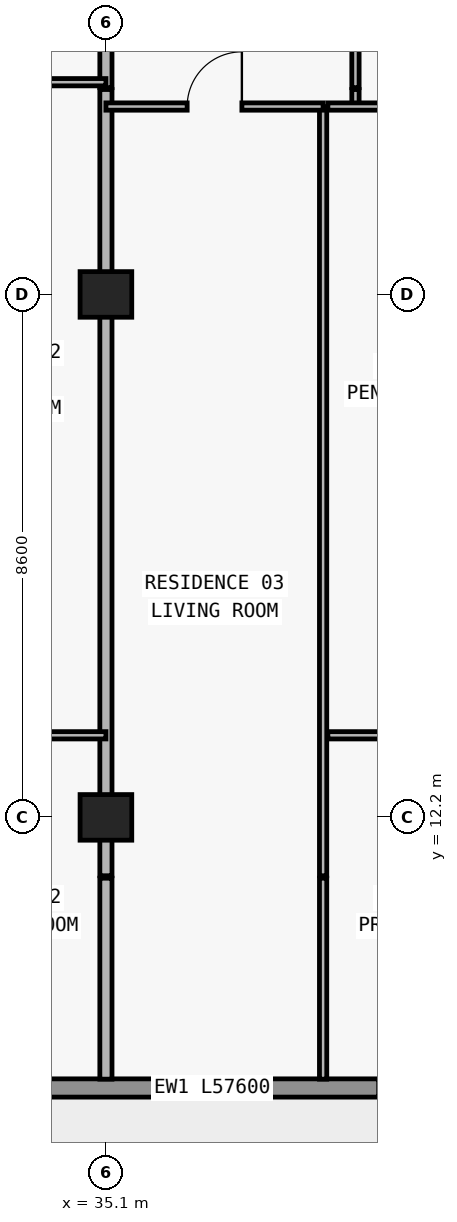
"""IFC4 building model, lengths in metres.
Left out: names, types, materials, properties, quantities, classifications, styles, units other than length and angle.
Written with IfcOpenShell. Run it as: python <this file> out.ifc"""

import sys

from ifc_helpers import new_model, si_unit, direction, frame, frame_2d, origin, origin_2d, place, context, subcontext, project, spatial, rectangle, extrude, element, fill, save


model = new_model("IFC4")
c1 = context("Model", 3, precision=1e-05, world=origin(), true_north=direction((0.0, 1.0)))
c2 = subcontext(c1, "Body", "Model", "MODEL_VIEW")
j1 = project(units=[si_unit("LENGTHUNIT", "METRE"), si_unit("PLANEANGLEUNIT", "RADIAN")], contexts=[c1])
p1 = place(None, origin())
s1 = spatial("IfcSite", under=j1, at=p1, CompositionType="ELEMENT")
p2 = place(p1, origin())
s2 = spatial("IfcBuilding", under=s1, at=p2, CompositionType="ELEMENT")
p3 = place(p2, frame((0.0, 0.0, 163.8)))
s3 = spatial("IfcBuildingStorey", under=s2, at=p3, CompositionType="ELEMENT", Elevation=163.8)
for number, where, z_axis, x_axis in (
    (1, (35.1, 12.2, 0.0), (0.0, 0.0, 1.0), (1.0, 0.0, 0.0)),
    (2, (35.1, 20.8, 0.0), (0.0, 0.0, 1.0), (1.0, 0.0, 0.0)),
):
    element("IfcColumn", number, at=place(p3, frame(where, z_axis=z_axis, x_axis=x_axis)), inside=s3, PredefinedType="COLUMN", context=c2, shape_type="SweptSolid", body=[
        extrude(rectangle(XDim=0.85, YDim=0.75, at=origin_2d()), origin(), (0.0, 0.0, 1.0), 3.05),
    ])
p4 = place(p3, frame((67.7, 7.75, 0.0), z_axis=(0.0, 0.0, 1.0), x_axis=(-1.0, 0.0, 0.0)))
e3 = element("IfcWall", 3, at=p4, inside=s3, PredefinedType="STANDARD", context=c2, shape_type="SweptSolid", body=[
    extrude(rectangle(XDim=57.6, YDim=0.3, at=frame_2d((28.8, 0.0))), origin(), (0.0, 0.0, 1.0), 3.05),
])
p5 = place(p4, frame((54.69, 0.0, 0.0)))
e4 = element("IfcOpeningElement", 4, at=p5, cuts=e3, PredefinedType="OPENING", context=c2, shape_type="SweptSolid", body=[
    extrude(rectangle(XDim=2.0, YDim=2.3, at=frame_2d((1.0, 1.15))), frame((0.0, 0.16, 0.0), z_axis=(0.0, -1.0, 0.0), x_axis=(1.0, 0.0, 0.0)), (0.0, 0.0, 1.0), 0.32),
])
p6 = place(p4, frame((50.21, 0.0, 0.65)))
e5 = element("IfcOpeningElement", 5, at=p6, cuts=e3, PredefinedType="OPENING", context=c2, shape_type="SweptSolid", body=[
    extrude(rectangle(XDim=2.6, YDim=1.85, at=frame_2d((1.3, 0.925))), frame((0.0, 0.16, 0.0), z_axis=(0.0, -1.0, 0.0), x_axis=(1.0, 0.0, 0.0)), (0.0, 0.0, 1.0), 0.32),
])
p7 = place(p4, frame((44.1, 0.0, 0.85)))
e6 = element("IfcOpeningElement", 6, at=p7, cuts=e3, PredefinedType="OPENING", context=c2, shape_type="SweptSolid", body=[
    extrude(rectangle(XDim=2.2, YDim=1.55, at=frame_2d((1.1, 0.775))), frame((0.0, 0.16, 0.0), z_axis=(0.0, -1.0, 0.0), x_axis=(1.0, 0.0, 0.0)), (0.0, 0.0, 1.0), 0.32),
])
p8 = place(p4, frame((37.69, 0.0, 0.0)))
e7 = element("IfcOpeningElement", 7, at=p8, cuts=e3, PredefinedType="OPENING", context=c2, shape_type="SweptSolid", body=[
    extrude(rectangle(XDim=2.0, YDim=2.3, at=frame_2d((1.0, 1.15))), frame((0.0, 0.16, 0.0), z_axis=(0.0, -1.0, 0.0), x_axis=(1.0, 0.0, 0.0)), (0.0, 0.0, 1.0), 0.32),
])
p9 = place(p4, frame((33.59, 0.0, 0.85)))
e8 = element("IfcOpeningElement", 8, at=p9, cuts=e3, PredefinedType="OPENING", context=c2, shape_type="SweptSolid", body=[
    extrude(rectangle(XDim=1.8, YDim=1.55, at=frame_2d((0.9, 0.775))), frame((0.0, 0.16, 0.0), z_axis=(0.0, -1.0, 0.0), x_axis=(1.0, 0.0, 0.0)), (0.0, 0.0, 1.0), 0.32),
])
p10 = place(p4, frame((25.914, 0.0, 0.85)))
e9 = element("IfcOpeningElement", 9, at=p10, cuts=e3, PredefinedType="OPENING", context=c2, shape_type="SweptSolid", body=[
    extrude(rectangle(XDim=2.2, YDim=1.55, at=frame_2d((1.1, 0.775))), frame((0.0, 0.16, 0.0), z_axis=(0.0, -1.0, 0.0), x_axis=(1.0, 0.0, 0.0)), (0.0, 0.0, 1.0), 0.32),
])
p11 = place(p4, frame((21.69, 0.0, 0.0)))
e10 = element("IfcOpeningElement", 10, at=p11, cuts=e3, PredefinedType="OPENING", context=c2, shape_type="SweptSolid", body=[
    extrude(rectangle(XDim=2.0, YDim=2.3, at=frame_2d((1.0, 1.15))), frame((0.0, 0.16, 0.0), z_axis=(0.0, -1.0, 0.0), x_axis=(1.0, 0.0, 0.0)), (0.0, 0.0, 1.0), 0.32),
])
p12 = place(p4, frame((17.59, 0.0, 0.85)))
e11 = element("IfcOpeningElement", 11, at=p12, cuts=e3, PredefinedType="OPENING", context=c2, shape_type="SweptSolid", body=[
    extrude(rectangle(XDim=1.8, YDim=1.55, at=frame_2d((0.9, 0.775))), frame((0.0, 0.16, 0.0), z_axis=(0.0, -1.0, 0.0), x_axis=(1.0, 0.0, 0.0)), (0.0, 0.0, 1.0), 0.32),
])
p13 = place(p4, frame((13.69, 0.0, 0.0)))
e12 = element("IfcOpeningElement", 12, at=p13, cuts=e3, PredefinedType="OPENING", context=c2, shape_type="SweptSolid", body=[
    extrude(rectangle(XDim=2.0, YDim=2.3, at=frame_2d((1.0, 1.15))), frame((0.0, 0.16, 0.0), z_axis=(0.0, -1.0, 0.0), x_axis=(1.0, 0.0, 0.0)), (0.0, 0.0, 1.0), 0.32),
])
p14 = place(p4, frame((9.01, 0.0, 0.65)))
e13 = element("IfcOpeningElement", 13, at=p14, cuts=e3, PredefinedType="OPENING", context=c2, shape_type="SweptSolid", body=[
    extrude(rectangle(XDim=2.6, YDim=1.85, at=frame_2d((1.3, 0.925))), frame((0.0, 0.16, 0.0), z_axis=(0.0, -1.0, 0.0), x_axis=(1.0, 0.0, 0.0)), (0.0, 0.0, 1.0), 0.32),
])
p15 = place(p4, frame((3.0, 0.0, 0.85)))
e14 = element("IfcOpeningElement", 14, at=p15, cuts=e3, PredefinedType="OPENING", context=c2, shape_type="SweptSolid", body=[
    extrude(rectangle(XDim=2.2, YDim=1.55, at=frame_2d((1.1, 0.775))), frame((0.0, 0.16, 0.0), z_axis=(0.0, -1.0, 0.0), x_axis=(1.0, 0.0, 0.0)), (0.0, 0.0, 1.0), 0.32),
])
p16 = place(p3, frame((35.1, 7.895, 0.0), z_axis=(0.0, 0.0, 1.0), x_axis=(0.0, 1.0, 0.0)))
e15 = element("IfcWall", 15, at=p16, inside=s3, PredefinedType="PARTITIONING", context=c2, shape_type="SweptSolid", body=[
    extrude(rectangle(XDim=3.305, YDim=0.2, at=frame_2d((1.652, 0.0))), origin(), (0.0, 0.0, 1.0), 3.05),
])
p17 = place(p3, frame((35.1, 11.24, 0.0), z_axis=(0.0, 0.0, 1.0), x_axis=(0.0, 1.0, 0.0)))
e16 = element("IfcWall", 16, at=p17, inside=s3, PredefinedType="PARTITIONING", context=c2, shape_type="SweptSolid", body=[
    extrude(rectangle(XDim=12.93, YDim=0.2, at=frame_2d((6.465, 0.0))), origin(), (0.0, 0.0, 1.0), 2.263),
])
p18 = place(p3, frame((35.1, 24.2, 0.0), z_axis=(0.0, 0.0, 1.0), x_axis=(0.0, 1.0, 0.0)))
e17 = element("IfcWall", 17, at=p18, inside=s3, PredefinedType="PARTITIONING", context=c2, shape_type="SweptSolid", body=[
    extrude(rectangle(XDim=4.84, YDim=0.2, at=frame_2d((2.42, 0.0))), origin(), (0.0, 0.0, 1.0), 2.263),
])
p19 = place(p3, frame((38.672, 7.895, 0.0), z_axis=(0.0, 0.0, 1.0), x_axis=(0.0, 1.0, 0.0)))
e18 = element("IfcWall", 18, at=p19, inside=s3, PredefinedType="PARTITIONING", context=c2, shape_type="SweptSolid", body=[
    extrude(rectangle(XDim=3.305, YDim=0.12, at=frame_2d((1.652, 0.0))), origin(), (0.0, 0.0, 1.0), 3.05),
])
p20 = place(p3, frame((38.672, 11.24, 0.0), z_axis=(0.0, 0.0, 1.0), x_axis=(0.0, 1.0, 0.0)))
e19 = element("IfcWall", 19, at=p20, inside=s3, PredefinedType="PARTITIONING", context=c2, shape_type="SweptSolid", body=[
    extrude(rectangle(XDim=12.65, YDim=0.12, at=frame_2d((6.325, 0.0))), origin(), (0.0, 0.0, 1.0), 2.499),
])
p21 = place(p3, frame((39.204, 23.89, 0.0), z_axis=(0.0, 0.0, 1.0), x_axis=(0.0, 1.0, 0.0)))
e20 = element("IfcWall", 20, at=p21, inside=s3, PredefinedType="PARTITIONING", context=c2, shape_type="SweptSolid", body=[
    extrude(rectangle(XDim=0.28, YDim=0.12, at=frame_2d((0.14, 0.0))), origin(), (0.0, 0.0, 1.0), 3.05),
])
p22 = place(p3, frame((39.204, 24.2, 0.0), z_axis=(0.0, 0.0, 1.0), x_axis=(0.0, 1.0, 0.0)))
e21 = element("IfcWall", 21, at=p22, inside=s3, PredefinedType="PARTITIONING", context=c2, shape_type="SweptSolid", body=[
    extrude(rectangle(XDim=4.84, YDim=0.12, at=frame_2d((2.42, 0.0))), origin(), (0.0, 0.0, 1.0), 3.05),
])
p23 = place(p22, frame((1.97, 0.0, 0.0)))
e22 = element("IfcOpeningElement", 22, at=p23, cuts=e21, PredefinedType="OPENING", context=c2, shape_type="SweptSolid", body=[
    extrude(rectangle(XDim=0.9, YDim=2.15, at=frame_2d((0.45, 1.075))), frame((0.0, 0.07, 0.0), z_axis=(0.0, -1.0, 0.0), x_axis=(1.0, 0.0, 0.0)), (0.0, 0.0, 1.0), 0.14),
])
p24 = place(p3, frame((31.32, 13.55, 0.0), z_axis=(0.0, 0.0, 1.0), x_axis=(1.0, 0.0, 0.0)))
e23 = element("IfcWall", 23, at=p24, inside=s3, PredefinedType="PARTITIONING", context=c2, shape_type="SweptSolid", body=[
    extrude(rectangle(XDim=3.78, YDim=0.12, at=frame_2d((1.89, 0.0))), origin(), (0.0, 0.0, 1.0), 3.05),
])
p25 = place(p24, frame((1.44, 0.0, 0.0)))
e24 = element("IfcOpeningElement", 24, at=p25, cuts=e23, PredefinedType="OPENING", context=c2, shape_type="SweptSolid", body=[
    extrude(rectangle(XDim=0.9, YDim=2.15, at=frame_2d((0.45, 1.075))), frame((0.0, 0.07, 0.0), z_axis=(0.0, -1.0, 0.0), x_axis=(1.0, 0.0, 0.0)), (0.0, 0.0, 1.0), 0.14),
])
p26 = place(p3, frame((38.75, 13.55, 0.0), z_axis=(0.0, 0.0, 1.0), x_axis=(1.0, 0.0, 0.0)))
e25 = element("IfcWall", 25, at=p26, inside=s3, PredefinedType="PARTITIONING", context=c2, shape_type="SweptSolid", body=[
    extrude(rectangle(XDim=3.95, YDim=0.12, at=frame_2d((1.975, 0.0))), origin(), (0.0, 0.0, 1.0), 3.05),
])
p27 = place(p26, frame((1.525, 0.0, 0.0)))
e26 = element("IfcOpeningElement", 26, at=p27, cuts=e25, PredefinedType="OPENING", context=c2, shape_type="SweptSolid", body=[
    extrude(rectangle(XDim=0.9, YDim=2.15, at=frame_2d((0.45, 1.075))), frame((0.0, 0.07, 0.0), z_axis=(0.0, -1.0, 0.0), x_axis=(1.0, 0.0, 0.0)), (0.0, 0.0, 1.0), 0.14),
])
p28 = place(p3, frame((35.1, 23.89, 0.0), z_axis=(0.0, 0.0, 1.0), x_axis=(1.0, 0.0, 0.0)))
e27 = element("IfcWall", 27, at=p28, inside=s3, PredefinedType="PARTITIONING", context=c2, shape_type="SweptSolid", body=[
    extrude(rectangle(XDim=3.572, YDim=0.12, at=frame_2d((1.786, 0.0))), origin(), (0.0, 0.0, 1.0), 3.05),
])
p29 = place(p28, frame((1.336, 0.0, 0.0)))
e28 = element("IfcOpeningElement", 28, at=p29, cuts=e27, PredefinedType="OPENING", context=c2, shape_type="SweptSolid", body=[
    extrude(rectangle(XDim=0.9, YDim=2.15, at=frame_2d((0.45, 1.075))), frame((0.0, 0.07, 0.0), z_axis=(0.0, -1.0, 0.0), x_axis=(1.0, 0.0, 0.0)), (0.0, 0.0, 1.0), 0.14),
])
p30 = place(p3, frame((38.75, 23.89, 0.0), z_axis=(0.0, 0.0, 1.0), x_axis=(1.0, 0.0, 0.0)))
e29 = element("IfcWall", 29, at=p30, inside=s3, PredefinedType="PARTITIONING", context=c2, shape_type="SweptSolid", body=[
    extrude(rectangle(XDim=3.95, YDim=0.12, at=frame_2d((1.975, 0.0))), origin(), (0.0, 0.0, 1.0), 3.05),
])
p31 = place(p30, frame((1.752, 0.0, 0.0)))
e30 = element("IfcOpeningElement", 30, at=p31, cuts=e29, PredefinedType="OPENING", context=c2, shape_type="SweptSolid", body=[
    extrude(rectangle(XDim=0.9, YDim=2.15, at=frame_2d((0.45, 1.075))), frame((0.0, 0.07, 0.0), z_axis=(0.0, -1.0, 0.0), x_axis=(1.0, 0.0, 0.0)), (0.0, 0.0, 1.0), 0.14),
])
p32 = place(p3, frame((26.92, 24.29, 0.0), z_axis=(0.0, 0.0, 1.0), x_axis=(1.0, 0.0, 0.0)))
e31 = element("IfcWall", 31, at=p32, inside=s3, PredefinedType="PARTITIONING", context=c2, shape_type="SweptSolid", body=[
    extrude(rectangle(XDim=8.18, YDim=0.12, at=frame_2d((4.09, 0.0))), origin(), (0.0, 0.0, 1.0), 3.05),
])
p33 = place(p32, frame((1.583, 0.0, 0.0)))
e32 = element("IfcOpeningElement", 32, at=p33, cuts=e31, PredefinedType="OPENING", context=c2, shape_type="SweptSolid", body=[
    extrude(rectangle(XDim=0.9, YDim=2.15, at=frame_2d((0.45, 1.075))), frame((0.0, 0.07, 0.0), z_axis=(0.0, -1.0, 0.0), x_axis=(1.0, 0.0, 0.0)), (0.0, 0.0, 1.0), 0.14),
])
p34 = place(p32, frame((5.84, 0.0, 0.0)))
e33 = element("IfcOpeningElement", 33, at=p34, cuts=e31, PredefinedType="OPENING", context=c2, shape_type="SweptSolid", body=[
    extrude(rectangle(XDim=0.9, YDim=2.15, at=frame_2d((0.45, 1.075))), frame((0.0, 0.07, 0.0), z_axis=(0.0, -1.0, 0.0), x_axis=(1.0, 0.0, 0.0)), (0.0, 0.0, 1.0), 0.14),
])
p35 = place(p29, origin())
e34 = element("IfcDoor", 34, at=p35, inside=s3, OperationType="SINGLE_SWING_RIGHT", PredefinedType="DOOR", context=c2, shape_type="SweptSolid", body=[
    extrude(rectangle(XDim=0.9, YDim=2.15, at=frame_2d((0.45, 1.075))), frame((0.0, 0.025, 0.0), z_axis=(0.0, -1.0, 0.0), x_axis=(1.0, 0.0, 0.0)), (0.0, 0.0, 1.0), 0.05),
])
fill(e28, e34)
save(model, sys.argv[1])
